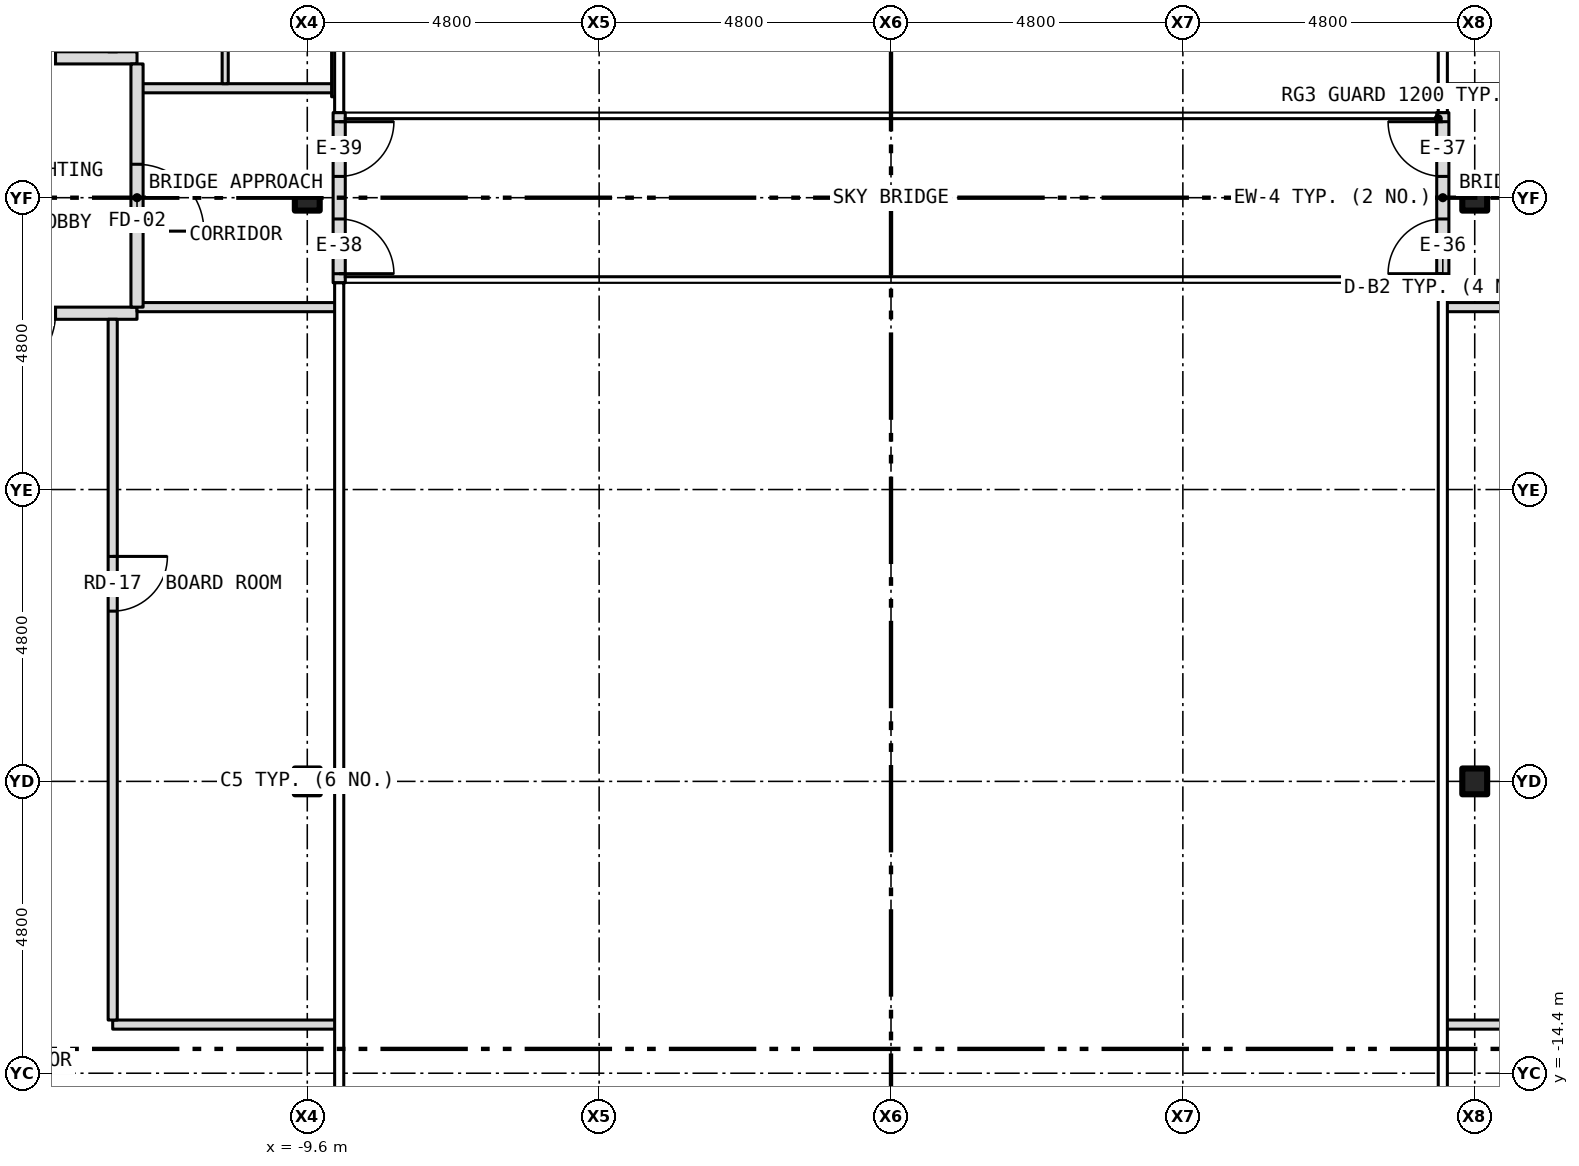
"""IFC4 building model, lengths in metres.
Left out: names, types, materials, properties, quantities, classifications, styles, units other than length and angle.
Written with IfcOpenShell. Run it as: python <this file> out.ifc"""

import sys

from ifc_helpers import new_model, si_unit, direction, frame, frame_2d, origin, origin_2d, place, context, subcontext, project, spatial, rectangle, i_section, extrude, element, fill, save


model = new_model("IFC4")
c1 = context("Model", 3, precision=1e-05, world=origin(), true_north=direction((0.0, 1.0)))
c2 = subcontext(c1, "Body", "Model", "MODEL_VIEW")
j1 = project(units=[si_unit("LENGTHUNIT", "METRE"), si_unit("PLANEANGLEUNIT", "RADIAN")], contexts=[c1])
p1 = place(None, origin())
s1 = spatial("IfcSite", under=j1, at=p1, CompositionType="ELEMENT")
p2 = place(p1, origin())
s2 = spatial("IfcBuilding", under=s1, at=p2, CompositionType="ELEMENT")
p3 = place(p2, frame((0.0, 0.0, 77.5)))
s3 = spatial("IfcBuildingStorey", under=s2, at=p3, CompositionType="ELEMENT", Elevation=77.5)
for number, where, z_axis, x_axis in (
    (1, (-9.6, -9.6, -0.15), (0.0, 0.0, 1.0), (1.0, 0.0, 0.0)),
    (2, (-9.6, 0.0, -0.15), (0.0, 0.0, 1.0), (1.0, 0.0, 0.0)),
    (3, (9.6, -9.6, -0.15), (0.0, 0.0, 1.0), (1.0, 0.0, 0.0)),
    (4, (9.6, 0.0, -0.15), (0.0, 0.0, 1.0), (1.0, 0.0, 0.0)),
):
    element("IfcColumn", number, at=place(p3, frame(where, z_axis=z_axis, x_axis=x_axis)), inside=s3, PredefinedType="COLUMN", context=c2, shape_type="SweptSolid", body=[
        extrude(i_section(OverallWidth=0.409, OverallDepth=0.424, WebThickness=0.033, FlangeThickness=0.052, at=origin_2d()), origin(), (0.0, 0.0, 1.0), 3.5),
    ])
p4 = place(p3, frame((9.075, -1.4, 0.0), z_axis=(0.0, 0.0, 1.0), x_axis=(0.0, 1.0, 0.0)))
e5 = element("IfcWall", 5, at=p4, inside=s3, PredefinedType="SOLIDWALL", context=c2, shape_type="SweptSolid", body=[
    extrude(rectangle(XDim=2.8, YDim=0.2, at=frame_2d((1.4, 0.0))), origin(), (0.0, 0.0, 1.0), 3.5),
])
p5 = place(p4, frame((0.15, 0.0, 0.0)))
e6 = element("IfcOpeningElement", 6, at=p5, cuts=e5, PredefinedType="OPENING", context=c2, shape_type="SweptSolid", body=[
    extrude(rectangle(XDim=0.9, YDim=2.1, at=frame_2d((0.45, 1.05))), frame((0.0, 0.112, 0.0), z_axis=(0.0, -1.0, 0.0), x_axis=(1.0, 0.0, 0.0)), (0.0, 0.0, 1.0), 0.224),
])
p6 = place(p4, frame((1.75, 0.0, 0.0)))
e7 = element("IfcOpeningElement", 7, at=p6, cuts=e5, PredefinedType="OPENING", context=c2, shape_type="SweptSolid", body=[
    extrude(rectangle(XDim=0.9, YDim=2.1, at=frame_2d((0.45, 1.05))), frame((0.0, 0.112, 0.0), z_axis=(0.0, -1.0, 0.0), x_axis=(1.0, 0.0, 0.0)), (0.0, 0.0, 1.0), 0.224),
])
p7 = place(p3, frame((-9.075, -1.4, 0.0), z_axis=(0.0, 0.0, 1.0), x_axis=(0.0, 1.0, 0.0)))
e8 = element("IfcWall", 8, at=p7, inside=s3, PredefinedType="SOLIDWALL", context=c2, shape_type="SweptSolid", body=[
    extrude(rectangle(XDim=2.8, YDim=0.2, at=frame_2d((1.4, 0.0))), origin(), (0.0, 0.0, 1.0), 3.5),
])
p8 = place(p7, frame((0.15, 0.0, 0.0)))
e9 = element("IfcOpeningElement", 9, at=p8, cuts=e8, PredefinedType="OPENING", context=c2, shape_type="SweptSolid", body=[
    extrude(rectangle(XDim=0.9, YDim=2.1, at=frame_2d((0.45, 1.05))), frame((0.0, 0.112, 0.0), z_axis=(0.0, -1.0, 0.0), x_axis=(1.0, 0.0, 0.0)), (0.0, 0.0, 1.0), 0.224),
])
p9 = place(p7, frame((1.75, 0.0, 0.0)))
e10 = element("IfcOpeningElement", 10, at=p9, cuts=e8, PredefinedType="OPENING", context=c2, shape_type="SweptSolid", body=[
    extrude(rectangle(XDim=0.9, YDim=2.1, at=frame_2d((0.45, 1.05))), frame((0.0, 0.112, 0.0), z_axis=(0.0, -1.0, 0.0), x_axis=(1.0, 0.0, 0.0)), (0.0, 0.0, 1.0), 0.224),
])
for number, where, z_axis, x_axis in (
    (11, (-12.8, -13.6, 0.0), (0.0, 0.0, 1.0), (1.0, 0.0, 0.0)),
    (12, (9.12, -13.6, 0.0), (0.0, 0.0, 1.0), (1.0, 0.0, 0.0)),
):
    element("IfcWall", number, at=place(p3, frame(where, z_axis=z_axis, x_axis=x_axis)), inside=s3, PredefinedType="PARTITIONING", context=c2, shape_type="SweptSolid", body=[
        extrude(rectangle(XDim=3.68, YDim=0.15, at=frame_2d((1.84, 0.0))), origin(), (0.0, 0.0, 1.0), 3.35),
    ])
p10 = place(p3, frame((-15.68, -1.9, 0.0), z_axis=(0.0, 0.0, 1.0), x_axis=(1.0, 0.0, 0.0)))
e13 = element("IfcWall", 13, at=p10, inside=s3, PredefinedType="PARTITIONING", context=c2, shape_type="SweptSolid", body=[
    extrude(rectangle(XDim=3.28, YDim=0.2, at=frame_2d((1.64, 0.0))), origin(), (0.0, 0.0, 1.0), 3.35),
])
p11 = place(p10, frame((0.84, 0.0, 0.0)))
e14 = element("IfcOpeningElement", 14, at=p11, cuts=e13, PredefinedType="OPENING", context=c2, shape_type="SweptSolid", body=[
    extrude(rectangle(XDim=1.1, YDim=2.1, at=frame_2d((0.55, 1.05))), frame((0.0, 0.112, 0.0), z_axis=(0.0, -1.0, 0.0), x_axis=(1.0, 0.0, 0.0)), (0.0, 0.0, 1.0), 0.224),
])
for number, where, z_axis, x_axis in (
    (15, (-12.4, -1.8, 0.0), (0.0, 0.0, 1.0), (1.0, 0.0, 0.0)),
    (16, (9.12, -1.8, 0.0), (0.0, 0.0, 1.0), (1.0, 0.0, 0.0)),
):
    element("IfcWall", number, at=place(p3, frame(where, z_axis=z_axis, x_axis=x_axis)), inside=s3, PredefinedType="PARTITIONING", context=c2, shape_type="SweptSolid", body=[
        extrude(rectangle(XDim=3.28, YDim=0.15, at=frame_2d((1.64, 0.0))), origin(), (0.0, 0.0, 1.0), 3.35),
    ])
p12 = place(p3, frame((-12.4, 1.8, 0.0), z_axis=(0.0, 0.0, 1.0), x_axis=(1.0, 0.0, 0.0)))
e17 = element("IfcWall", 17, at=p12, inside=s3, PredefinedType="PARTITIONING", context=c2, shape_type="SweptSolid", body=[
    extrude(rectangle(XDim=3.25, YDim=0.15, at=frame_2d((1.625, 0.0))), origin(), (0.0, 0.0, 1.0), 3.35),
])
p13 = place(p3, frame((9.12, 1.8, 0.0), z_axis=(0.0, 0.0, 1.0), x_axis=(1.0, 0.0, 0.0)))
e18 = element("IfcWall", 18, at=p13, inside=s3, PredefinedType="PARTITIONING", context=c2, shape_type="SweptSolid", body=[
    extrude(rectangle(XDim=3.28, YDim=0.15, at=frame_2d((1.64, 0.0))), origin(), (0.0, 0.0, 1.0), 3.35),
])
p14 = place(p3, frame((-15.68, 2.3, 0.0), z_axis=(0.0, 0.0, 1.0), x_axis=(1.0, 0.0, 0.0)))
e19 = element("IfcWall", 19, at=p14, inside=s3, PredefinedType="PARTITIONING", context=c2, shape_type="SweptSolid", body=[
    extrude(rectangle(XDim=3.28, YDim=0.2, at=frame_2d((1.64, 0.0))), origin(), (0.0, 0.0, 1.0), 3.35),
])
p15 = place(p14, frame((0.84, 0.0, 0.0)))
e20 = element("IfcOpeningElement", 20, at=p15, cuts=e19, PredefinedType="OPENING", context=c2, shape_type="SweptSolid", body=[
    extrude(rectangle(XDim=1.1, YDim=2.1, at=frame_2d((0.55, 1.05))), frame((0.0, 0.112, 0.0), z_axis=(0.0, -1.0, 0.0), x_axis=(1.0, 0.0, 0.0)), (0.0, 0.0, 1.0), 0.224),
])
p16 = place(p3, frame((-12.8, -13.525, 0.0), z_axis=(0.0, 0.0, 1.0), x_axis=(0.0, 1.0, 0.0)))
e21 = element("IfcWall", 21, at=p16, inside=s3, PredefinedType="PARTITIONING", context=c2, shape_type="SweptSolid", body=[
    extrude(rectangle(XDim=11.525, YDim=0.15, at=frame_2d((5.762, 0.0))), origin(), (0.0, 0.0, 1.0), 3.35),
])
p17 = place(p16, frame((6.725, 0.0, 0.0)))
e22 = element("IfcOpeningElement", 22, at=p17, cuts=e21, PredefinedType="OPENING", context=c2, shape_type="SweptSolid", body=[
    extrude(rectangle(XDim=0.9, YDim=2.1, at=frame_2d((0.45, 1.05))), frame((0.0, 0.087, 0.0), z_axis=(0.0, -1.0, 0.0), x_axis=(1.0, 0.0, 0.0)), (0.0, 0.0, 1.0), 0.174),
])
p18 = place(p3, frame((-12.8, 2.4, 0.0), z_axis=(0.0, 0.0, 1.0), x_axis=(0.0, 1.0, 0.0)))
e23 = element("IfcWall", 23, at=p18, inside=s3, PredefinedType="PARTITIONING", context=c2, shape_type="SweptSolid", body=[
    extrude(rectangle(XDim=3.425, YDim=0.15, at=frame_2d((1.712, 0.0))), origin(), (0.0, 0.0, 1.0), 3.35),
])
p19 = place(p18, frame((1.25, 0.0, 0.0)))
e24 = element("IfcOpeningElement", 24, at=p19, cuts=e23, PredefinedType="OPENING", context=c2, shape_type="SweptSolid", body=[
    extrude(rectangle(XDim=0.9, YDim=2.1, at=frame_2d((0.45, 1.05))), frame((0.0, 0.087, 0.0), z_axis=(0.0, -1.0, 0.0), x_axis=(1.0, 0.0, 0.0)), (0.0, 0.0, 1.0), 0.174),
])
p20 = place(p3, frame((-12.4, -1.8, 0.0), z_axis=(0.0, 0.0, 1.0), x_axis=(0.0, 1.0, 0.0)))
e25 = element("IfcWall", 25, at=p20, inside=s3, PredefinedType="PARTITIONING", context=c2, shape_type="SweptSolid", body=[
    extrude(rectangle(XDim=4.0, YDim=0.2, at=frame_2d((2.0, 0.0))), origin(), (0.0, 0.0, 1.0), 3.35),
])
p21 = place(p20, frame((1.25, 0.0, 0.0)))
e26 = element("IfcOpeningElement", 26, at=p21, cuts=e25, PredefinedType="OPENING", context=c2, shape_type="SweptSolid", body=[
    extrude(rectangle(XDim=1.1, YDim=2.1, at=frame_2d((0.55, 1.05))), frame((0.0, 0.112, 0.0), z_axis=(0.0, -1.0, 0.0), x_axis=(1.0, 0.0, 0.0)), (0.0, 0.0, 1.0), 0.224),
])
p22 = place(p3, frame((-10.95, 1.875, 0.0), z_axis=(0.0, 0.0, 1.0), x_axis=(0.0, 1.0, 0.0)))
e27 = element("IfcWall", 27, at=p22, inside=s3, PredefinedType="PARTITIONING", context=c2, shape_type="SweptSolid", body=[
    extrude(rectangle(XDim=3.95, YDim=0.1, at=frame_2d((1.975, 0.0))), origin(), (0.0, 0.0, 1.0), 3.35),
])
p23 = place(p3, frame((-9.15, 1.66, 0.0), z_axis=(0.0, 0.0, 1.0), x_axis=(0.0, 1.0, 0.0)))
e28 = element("IfcWall", 28, at=p23, inside=s3, PredefinedType="PARTITIONING", context=c2, shape_type="SweptSolid", body=[
    extrude(rectangle(XDim=4.38, YDim=0.1, at=frame_2d((2.19, 0.0))), origin(), (0.0, 0.0, 1.0), 2.733),
])
p24 = place(p5, origin())
e29 = element("IfcDoor", 29, at=p24, inside=s3, OperationType="SINGLE_SWING_LEFT", PredefinedType="DOOR", context=c2, shape_type="SweptSolid", body=[
    extrude(rectangle(XDim=0.9, YDim=2.1, at=frame_2d((0.45, 1.05))), frame((0.0, 0.025, 0.0), z_axis=(0.0, -1.0, 0.0), x_axis=(1.0, 0.0, 0.0)), (0.0, 0.0, 1.0), 0.05),
])
fill(e6, e29)
p25 = place(p6, origin())
e30 = element("IfcDoor", 30, at=p25, inside=s3, OperationType="SINGLE_SWING_RIGHT", PredefinedType="DOOR", context=c2, shape_type="SweptSolid", body=[
    extrude(rectangle(XDim=0.9, YDim=2.1, at=frame_2d((0.45, 1.05))), frame((0.0, 0.025, 0.0), z_axis=(0.0, -1.0, 0.0), x_axis=(1.0, 0.0, 0.0)), (0.0, 0.0, 1.0), 0.05),
])
fill(e7, e30)
p26 = place(p8, origin())
e31 = element("IfcDoor", 31, at=p26, inside=s3, OperationType="SINGLE_SWING_LEFT", PredefinedType="DOOR", context=c2, shape_type="SweptSolid", body=[
    extrude(rectangle(XDim=0.9, YDim=2.1, at=frame_2d((0.45, 1.05))), frame((0.0, 0.025, 0.0), z_axis=(0.0, -1.0, 0.0), x_axis=(1.0, 0.0, 0.0)), (0.0, 0.0, 1.0), 0.05),
])
fill(e9, e31)
p27 = place(p9, origin())
e32 = element("IfcDoor", 32, at=p27, inside=s3, OperationType="SINGLE_SWING_RIGHT", PredefinedType="DOOR", context=c2, shape_type="SweptSolid", body=[
    extrude(rectangle(XDim=0.9, YDim=2.1, at=frame_2d((0.45, 1.05))), frame((0.0, 0.025, 0.0), z_axis=(0.0, -1.0, 0.0), x_axis=(1.0, 0.0, 0.0)), (0.0, 0.0, 1.0), 0.05),
])
fill(e10, e32)
p28 = place(p21, origin())
e33 = element("IfcDoor", 33, at=p28, inside=s3, OperationType="SINGLE_SWING_LEFT", PredefinedType="DOOR", context=c2, shape_type="SweptSolid", body=[
    extrude(rectangle(XDim=1.1, YDim=2.1, at=frame_2d((0.55, 1.05))), frame((0.0, 0.025, 0.0), z_axis=(0.0, -1.0, 0.0), x_axis=(1.0, 0.0, 0.0)), (0.0, 0.0, 1.0), 0.05),
])
fill(e26, e33)
p29 = place(p11, origin())
e34 = element("IfcDoor", 34, at=p29, inside=s3, OperationType="SINGLE_SWING_LEFT", PredefinedType="DOOR", context=c2, shape_type="SweptSolid", body=[
    extrude(rectangle(XDim=1.1, YDim=2.1, at=frame_2d((0.55, 1.05))), frame((0.0, 0.025, 0.0), z_axis=(0.0, -1.0, 0.0), x_axis=(1.0, 0.0, 0.0)), (0.0, 0.0, 1.0), 0.05),
])
fill(e14, e34)
p30 = place(p15, origin())
e35 = element("IfcDoor", 35, at=p30, inside=s3, OperationType="SINGLE_SWING_LEFT", PredefinedType="DOOR", context=c2, shape_type="SweptSolid", body=[
    extrude(rectangle(XDim=1.1, YDim=2.1, at=frame_2d((0.55, 1.05))), frame((0.0, 0.025, 0.0), z_axis=(0.0, -1.0, 0.0), x_axis=(1.0, 0.0, 0.0)), (0.0, 0.0, 1.0), 0.05),
])
fill(e20, e35)
p31 = place(p17, origin())
e36 = element("IfcDoor", 36, at=p31, inside=s3, OperationType="SINGLE_SWING_RIGHT", PredefinedType="DOOR", context=c2, shape_type="SweptSolid", body=[
    extrude(rectangle(XDim=0.9, YDim=2.1, at=frame_2d((0.45, 1.05))), frame((0.0, 0.025, 0.0), z_axis=(0.0, -1.0, 0.0), x_axis=(1.0, 0.0, 0.0)), (0.0, 0.0, 1.0), 0.05),
])
fill(e22, e36)
save(model, sys.argv[1])
